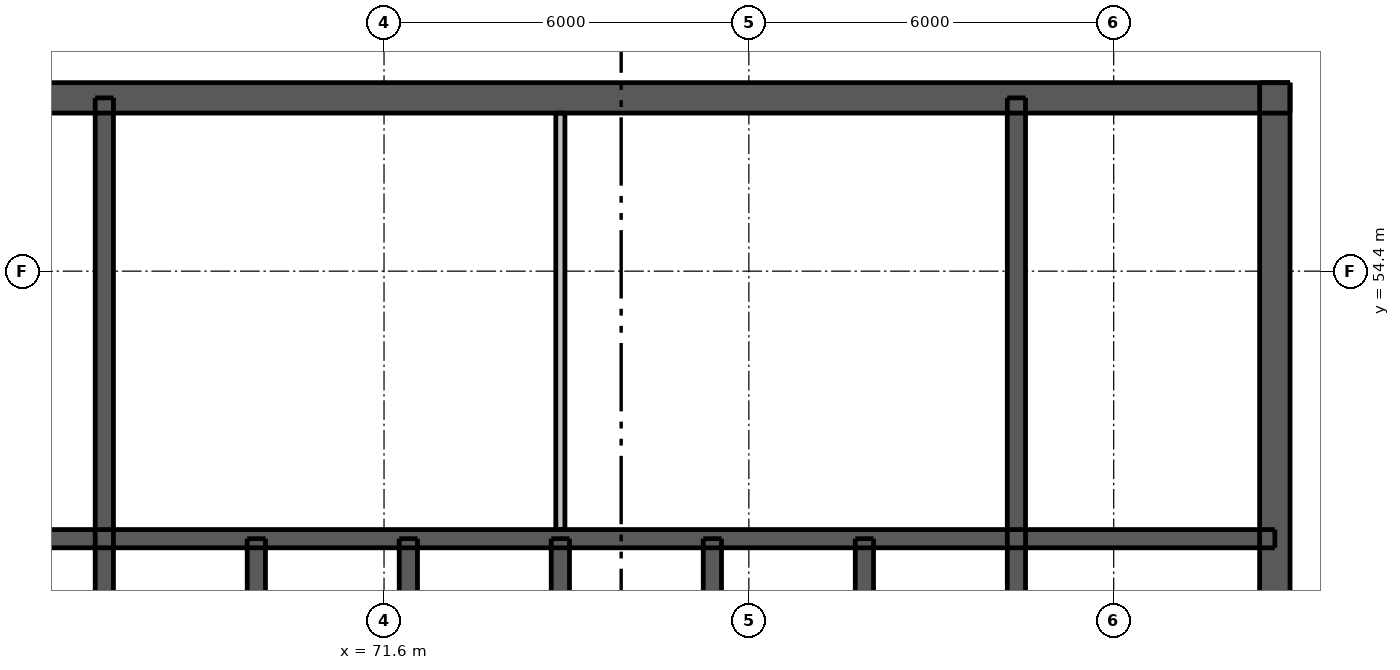
"""IFC4 building model, lengths in metres.
Left out: names, types, materials, properties, quantities, classifications, styles, units other than length and angle.
Written with IfcOpenShell. Run it as: python <this file> out.ifc"""

import sys

from ifc_helpers import new_model, si_unit, direction, frame, frame_2d, origin, place, context, subcontext, project, spatial, rectangle, extrude, element, fill, save


model = new_model("IFC4")
c1 = context("Model", 3, precision=1e-05, world=origin(), true_north=direction((0.0, 1.0)))
c2 = subcontext(c1, "Body", "Model", "MODEL_VIEW")
j1 = project(units=[si_unit("LENGTHUNIT", "METRE"), si_unit("PLANEANGLEUNIT", "RADIAN")], contexts=[c1])
p1 = place(None, origin())
s1 = spatial("IfcSite", under=j1, at=p1, CompositionType="ELEMENT")
p2 = place(p1, origin())
s2 = spatial("IfcBuilding", under=s1, at=p2, CompositionType="ELEMENT")
p3 = place(p2, frame((0.0, 0.0, 245.5)))
s3 = spatial("IfcBuildingStorey", under=s2, at=p3, CompositionType="ELEMENT", Elevation=245.5)
p4 = place(p3, frame((62.5, 57.25, 0.0), z_axis=(0.0, 0.0, 1.0), x_axis=(1.0, 0.0, 0.0)))
e1 = element("IfcWall", 1, at=p4, inside=s3, PredefinedType="SHEAR", context=c2, shape_type="SweptSolid", body=[
    extrude(rectangle(XDim=24.0, YDim=0.5, at=frame_2d((12.0, 0.0))), origin(), (0.0, 0.0, 1.0), 3.05),
])
p5 = place(p4, frame((21.025, 0.0, 0.0)))
e2 = element("IfcOpeningElement", 2, at=p5, cuts=e1, PredefinedType="OPENING", context=c2, shape_type="SweptSolid", body=[
    extrude(rectangle(XDim=1.1, YDim=2.1, at=frame_2d((0.55, 1.05))), frame((0.0, 0.26, 0.0), z_axis=(0.0, -1.0, 0.0), x_axis=(1.0, 0.0, 0.0)), (0.0, 0.0, 1.0), 0.52),
])
p6 = place(p4, frame((1.875, 0.0, 0.0)))
e3 = element("IfcOpeningElement", 3, at=p6, cuts=e1, PredefinedType="OPENING", context=c2, shape_type="SweptSolid", body=[
    extrude(rectangle(XDim=1.1, YDim=2.1, at=frame_2d((0.55, 1.05))), frame((0.0, 0.26, 0.0), z_axis=(0.0, -1.0, 0.0), x_axis=(1.0, 0.0, 0.0)), (0.0, 0.0, 1.0), 0.52),
])
p7 = place(p4, frame((7.875, 0.0, 0.0)))
e4 = element("IfcOpeningElement", 4, at=p7, cuts=e1, PredefinedType="OPENING", context=c2, shape_type="SweptSolid", body=[
    extrude(rectangle(XDim=0.9, YDim=2.1, at=frame_2d((0.45, 1.05))), frame((0.0, 0.26, 0.0), z_axis=(0.0, -1.0, 0.0), x_axis=(1.0, 0.0, 0.0)), (0.0, 0.0, 1.0), 0.52),
])
p8 = place(p4, frame((15.225, 0.0, 0.0)))
e5 = element("IfcOpeningElement", 5, at=p8, cuts=e1, PredefinedType="OPENING", context=c2, shape_type="SweptSolid", body=[
    extrude(rectangle(XDim=0.9, YDim=2.1, at=frame_2d((0.45, 1.05))), frame((0.0, 0.26, 0.0), z_axis=(0.0, -1.0, 0.0), x_axis=(1.0, 0.0, 0.0)), (0.0, 0.0, 1.0), 0.52),
])
p9 = place(p3, frame((86.25, 33.5, 0.0), z_axis=(0.0, 0.0, 1.0), x_axis=(0.0, 1.0, 0.0)))
e6 = element("IfcWall", 6, at=p9, inside=s3, PredefinedType="SHEAR", context=c2, shape_type="SweptSolid", body=[
    extrude(rectangle(XDim=24.0, YDim=0.5, at=frame_2d((12.0, 0.0))), origin(), (0.0, 0.0, 1.0), 3.05),
])
p10 = place(p9, frame((11.2, 0.0, 0.0)))
e7 = element("IfcOpeningElement", 7, at=p10, cuts=e6, PredefinedType="OPENING", context=c2, shape_type="SweptSolid", body=[
    extrude(rectangle(XDim=1.6, YDim=2.1, at=frame_2d((0.8, 1.05))), frame((0.0, 0.26, 0.0), z_axis=(0.0, -1.0, 0.0), x_axis=(1.0, 0.0, 0.0)), (0.0, 0.0, 1.0), 0.52),
])
p11 = place(p3, frame((62.75, 50.0, 0.0), z_axis=(0.0, 0.0, 1.0), x_axis=(1.0, 0.0, 0.0)))
e8 = element("IfcWall", 8, at=p11, inside=s3, PredefinedType="SHEAR", context=c2, shape_type="SweptSolid", body=[
    extrude(rectangle(XDim=23.5, YDim=0.3, at=frame_2d((11.75, 0.0))), origin(), (0.0, 0.0, 1.0), 3.05),
])
for number, where, z_axis, x_axis in (
    (9, (67.0, 47.1, 0.0), (0.0, 0.0, 1.0), (0.0, 1.0, 0.0)),
    (10, (82.0, 47.1, 0.0), (0.0, 0.0, 1.0), (0.0, 1.0, 0.0)),
):
    element("IfcWall", number, at=place(p3, frame(where, z_axis=z_axis, x_axis=x_axis)), inside=s3, PredefinedType="SHEAR", context=c2, shape_type="SweptSolid", body=[
        extrude(rectangle(XDim=10.15, YDim=0.3, at=frame_2d((5.075, 0.0))), origin(), (0.0, 0.0, 1.0), 3.05),
    ])
for number, where, z_axis, x_axis in (
    (11, (69.5, 47.1, 0.0), (0.0, 0.0, 1.0), (0.0, 1.0, 0.0)),
    (12, (72.0, 47.1, 0.0), (0.0, 0.0, 1.0), (0.0, 1.0, 0.0)),
    (13, (74.5, 47.1, 0.0), (0.0, 0.0, 1.0), (0.0, 1.0, 0.0)),
    (14, (77.0, 47.1, 0.0), (0.0, 0.0, 1.0), (0.0, 1.0, 0.0)),
    (15, (79.5, 47.1, 0.0), (0.0, 0.0, 1.0), (0.0, 1.0, 0.0)),
):
    element("IfcWall", number, at=place(p3, frame(where, z_axis=z_axis, x_axis=x_axis)), inside=s3, PredefinedType="SHEAR", context=c2, shape_type="SweptSolid", body=[
        extrude(rectangle(XDim=2.9, YDim=0.3, at=frame_2d((1.45, 0.0))), origin(), (0.0, 0.0, 1.0), 3.05),
    ])
p12 = place(p3, frame((74.5, 50.15, 0.0), z_axis=(0.0, 0.0, 1.0), x_axis=(0.0, 1.0, 0.0)))
e16 = element("IfcWall", 16, at=p12, inside=s3, PredefinedType="PLUMBINGWALL", context=c2, shape_type="SweptSolid", body=[
    extrude(rectangle(XDim=6.85, YDim=0.15, at=frame_2d((3.425, 0.0))), origin(), (0.0, 0.0, 1.0), 3.05),
])
p13 = place(p5, origin())
e17 = element("IfcDoor", 17, at=p13, inside=s3, OperationType="SINGLE_SWING_RIGHT", PredefinedType="DOOR", context=c2, shape_type="SweptSolid", body=[
    extrude(rectangle(XDim=1.1, YDim=2.1, at=frame_2d((0.55, 1.05))), frame((0.0, -0.188, 0.0), z_axis=(0.0, -1.0, 0.0), x_axis=(1.0, 0.0, 0.0)), (0.0, 0.0, 1.0), 0.05),
])
fill(e2, e17)
p14 = place(p7, origin())
e18 = element("IfcDoor", 18, at=p14, inside=s3, OperationType="SINGLE_SWING_RIGHT", PredefinedType="DOOR", context=c2, shape_type="SweptSolid", body=[
    extrude(rectangle(XDim=0.9, YDim=2.1, at=frame_2d((0.45, 1.05))), frame((0.0, -0.188, 0.0), z_axis=(0.0, -1.0, 0.0), x_axis=(1.0, 0.0, 0.0)), (0.0, 0.0, 1.0), 0.05),
])
fill(e4, e18)
p15 = place(p8, origin())
e19 = element("IfcDoor", 19, at=p15, inside=s3, OperationType="SINGLE_SWING_RIGHT", PredefinedType="DOOR", context=c2, shape_type="SweptSolid", body=[
    extrude(rectangle(XDim=0.9, YDim=2.1, at=frame_2d((0.45, 1.05))), frame((0.0, -0.188, 0.0), z_axis=(0.0, -1.0, 0.0), x_axis=(1.0, 0.0, 0.0)), (0.0, 0.0, 1.0), 0.05),
])
fill(e5, e19)
save(model, sys.argv[1])
